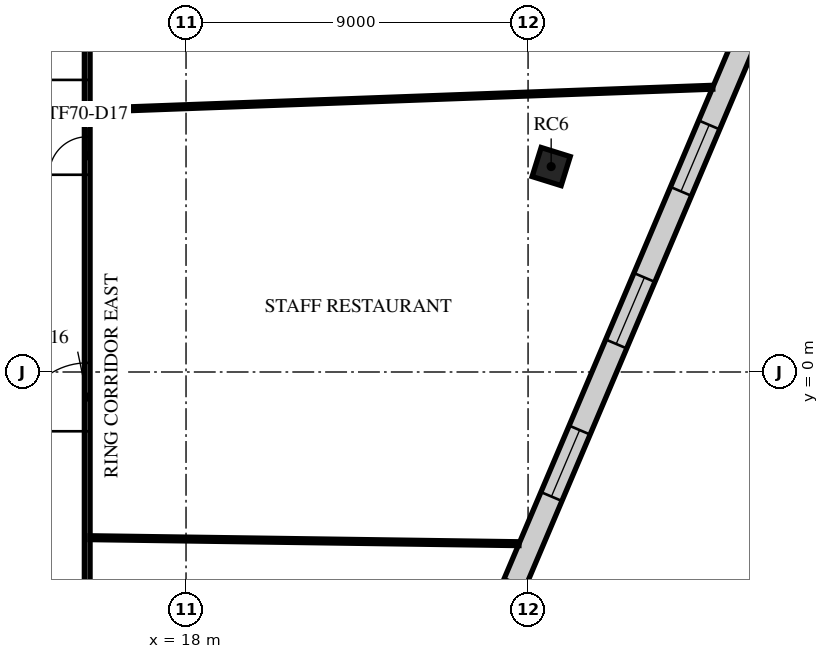
"""IFC4 building model, lengths in metres.
Left out: names, types, materials, properties, quantities, classifications, styles, units other than length and angle.
Written with IfcOpenShell. Run it as: python <this file> out.ifc"""

import sys

from ifc_helpers import new_model, si_unit, direction, frame, frame_2d, origin, origin_2d, place, context, subcontext, project, spatial, rectangle, extrude, element, fill, save


model = new_model("IFC4")
c1 = context("Model", 3, precision=1e-05, world=origin(), true_north=direction((0.0, 1.0)))
c2 = subcontext(c1, "Body", "Model", "MODEL_VIEW")
j1 = project(units=[si_unit("LENGTHUNIT", "METRE"), si_unit("PLANEANGLEUNIT", "RADIAN")], contexts=[c1])
p1 = place(None, origin())
s1 = spatial("IfcSite", under=j1, at=p1, CompositionType="ELEMENT")
p2 = place(p1, origin())
s2 = spatial("IfcBuilding", under=s1, at=p2, CompositionType="ELEMENT")
p3 = place(p2, frame((0.0, 0.0, 296.5)))
s3 = spatial("IfcBuildingStorey", under=s2, at=p3, CompositionType="ELEMENT", Elevation=296.5)
p4 = place(p3, frame((27.608, 5.406, -0.35), z_axis=(0.0, 0.0, 1.0), x_axis=(0.297503182032, 0.954720826567, 0.0)))
e1 = element("IfcColumn", 1, at=p4, inside=s3, PredefinedType="COLUMN", context=c2, shape_type="SweptSolid", body=[
    extrude(rectangle(XDim=0.8, YDim=0.8, at=origin_2d()), origin(), (0.0, 0.0, 1.0), 4.35),
])
p5 = place(p3, frame((15.204, -32.515, 0.0), z_axis=(0.0, 0.0, 1.0), x_axis=(0.390728997462, 0.920505758017, 0.0)))
e2 = element("IfcWall", 2, at=p5, inside=s3, PredefinedType="STANDARD", context=c2, shape_type="SweptSolid", body=[
    extrude(rectangle(XDim=47.979, YDim=0.6, at=frame_2d((23.99, 0.0))), origin(), (0.0, 0.0, 1.0), 3.65),
])
p6 = place(p5, frame((1.231, 0.0, 0.9)))
e3 = element("IfcOpeningElement", 3, at=p6, cuts=e2, PredefinedType="OPENING", context=c2, shape_type="SweptSolid", body=[
    extrude(rectangle(XDim=1.9, YDim=2.1, at=frame_2d((0.95, 1.05))), frame((0.0, 0.31, 0.0), z_axis=(0.0, -1.0, 0.0), x_axis=(1.0, 0.0, 0.0)), (0.0, 0.0, 1.0), 0.62),
])
p7 = place(p5, frame((5.593, 0.0, 0.9)))
e4 = element("IfcOpeningElement", 4, at=p7, cuts=e2, PredefinedType="OPENING", context=c2, shape_type="SweptSolid", body=[
    extrude(rectangle(XDim=1.9, YDim=2.1, at=frame_2d((0.95, 1.05))), frame((0.0, 0.31, 0.0), z_axis=(0.0, -1.0, 0.0), x_axis=(1.0, 0.0, 0.0)), (0.0, 0.0, 1.0), 0.62),
])
p8 = place(p5, frame((9.954, 0.0, 0.9)))
e5 = element("IfcOpeningElement", 5, at=p8, cuts=e2, PredefinedType="OPENING", context=c2, shape_type="SweptSolid", body=[
    extrude(rectangle(XDim=1.9, YDim=2.1, at=frame_2d((0.95, 1.05))), frame((0.0, 0.31, 0.0), z_axis=(0.0, -1.0, 0.0), x_axis=(1.0, 0.0, 0.0)), (0.0, 0.0, 1.0), 0.62),
])
p9 = place(p5, frame((14.316, 0.0, 0.9)))
e6 = element("IfcOpeningElement", 6, at=p9, cuts=e2, PredefinedType="OPENING", context=c2, shape_type="SweptSolid", body=[
    extrude(rectangle(XDim=1.9, YDim=2.1, at=frame_2d((0.95, 1.05))), frame((0.0, 0.31, 0.0), z_axis=(0.0, -1.0, 0.0), x_axis=(1.0, 0.0, 0.0)), (0.0, 0.0, 1.0), 0.62),
])
p10 = place(p5, frame((18.678, 0.0, 0.9)))
e7 = element("IfcOpeningElement", 7, at=p10, cuts=e2, PredefinedType="OPENING", context=c2, shape_type="SweptSolid", body=[
    extrude(rectangle(XDim=1.9, YDim=2.1, at=frame_2d((0.95, 1.05))), frame((0.0, 0.31, 0.0), z_axis=(0.0, -1.0, 0.0), x_axis=(1.0, 0.0, 0.0)), (0.0, 0.0, 1.0), 0.62),
])
p11 = place(p5, frame((23.04, 0.0, 0.9)))
e8 = element("IfcOpeningElement", 8, at=p11, cuts=e2, PredefinedType="OPENING", context=c2, shape_type="SweptSolid", body=[
    extrude(rectangle(XDim=1.9, YDim=2.1, at=frame_2d((0.95, 1.05))), frame((0.0, 0.31, 0.0), z_axis=(0.0, -1.0, 0.0), x_axis=(1.0, 0.0, 0.0)), (0.0, 0.0, 1.0), 0.62),
])
p12 = place(p5, frame((27.401, 0.0, 0.9)))
e9 = element("IfcOpeningElement", 9, at=p12, cuts=e2, PredefinedType="OPENING", context=c2, shape_type="SweptSolid", body=[
    extrude(rectangle(XDim=1.9, YDim=2.1, at=frame_2d((0.95, 1.05))), frame((0.0, 0.31, 0.0), z_axis=(0.0, -1.0, 0.0), x_axis=(1.0, 0.0, 0.0)), (0.0, 0.0, 1.0), 0.62),
])
p13 = place(p5, frame((31.763, 0.0, 0.9)))
e10 = element("IfcOpeningElement", 10, at=p13, cuts=e2, PredefinedType="OPENING", context=c2, shape_type="SweptSolid", body=[
    extrude(rectangle(XDim=1.9, YDim=2.1, at=frame_2d((0.95, 1.05))), frame((0.0, 0.31, 0.0), z_axis=(0.0, -1.0, 0.0), x_axis=(1.0, 0.0, 0.0)), (0.0, 0.0, 1.0), 0.62),
])
p14 = place(p5, frame((36.125, 0.0, 0.9)))
e11 = element("IfcOpeningElement", 11, at=p14, cuts=e2, PredefinedType="OPENING", context=c2, shape_type="SweptSolid", body=[
    extrude(rectangle(XDim=1.9, YDim=2.1, at=frame_2d((0.95, 1.05))), frame((0.0, 0.31, 0.0), z_axis=(0.0, -1.0, 0.0), x_axis=(1.0, 0.0, 0.0)), (0.0, 0.0, 1.0), 0.62),
])
p15 = place(p5, frame((40.487, 0.0, 0.9)))
e12 = element("IfcOpeningElement", 12, at=p15, cuts=e2, PredefinedType="OPENING", context=c2, shape_type="SweptSolid", body=[
    extrude(rectangle(XDim=1.9, YDim=2.1, at=frame_2d((0.95, 1.05))), frame((0.0, 0.31, 0.0), z_axis=(0.0, -1.0, 0.0), x_axis=(1.0, 0.0, 0.0)), (0.0, 0.0, 1.0), 0.62),
])
p16 = place(p5, frame((44.848, 0.0, 0.9)))
e13 = element("IfcOpeningElement", 13, at=p16, cuts=e2, PredefinedType="OPENING", context=c2, shape_type="SweptSolid", body=[
    extrude(rectangle(XDim=1.9, YDim=2.1, at=frame_2d((0.95, 1.05))), frame((0.0, 0.31, 0.0), z_axis=(0.0, -1.0, 0.0), x_axis=(1.0, 0.0, 0.0)), (0.0, 0.0, 1.0), 0.62),
])
p17 = place(p3, frame((15.4, -12.4, 0.0), z_axis=(0.0, 0.0, 1.0), x_axis=(0.0, 1.0, 0.0)))
e14 = element("IfcWall", 14, at=p17, inside=s3, PredefinedType="PARTITIONING", context=c2, shape_type="SweptSolid", body=[
    extrude(rectangle(XDim=24.725, YDim=0.15, at=frame_2d((12.362, 0.0))), origin(), (0.0, 0.0, 1.0), 3.25),
])
p18 = place(p17, frame((2.8, 0.0, 0.0)))
e15 = element("IfcOpeningElement", 15, at=p18, cuts=e14, PredefinedType="OPENING", context=c2, shape_type="SweptSolid", body=[
    extrude(rectangle(XDim=1.8, YDim=2.1, at=frame_2d((0.9, 1.05))), frame((0.0, 0.085, 0.0), z_axis=(0.0, -1.0, 0.0), x_axis=(1.0, 0.0, 0.0)), (0.0, 0.0, 1.0), 0.17),
])
p19 = place(p17, frame((10.84, 0.0, 0.0)))
e16 = element("IfcOpeningElement", 16, at=p19, cuts=e14, PredefinedType="OPENING", context=c2, shape_type="SweptSolid", body=[
    extrude(rectangle(XDim=1.8, YDim=2.1, at=frame_2d((0.9, 1.05))), frame((0.0, 0.085, 0.0), z_axis=(0.0, -1.0, 0.0), x_axis=(1.0, 0.0, 0.0)), (0.0, 0.0, 1.0), 0.17),
])
p20 = place(p17, frame((17.59, 0.0, 0.0)))
e17 = element("IfcOpeningElement", 17, at=p20, cuts=e14, PredefinedType="OPENING", context=c2, shape_type="SweptSolid", body=[
    extrude(rectangle(XDim=1.0, YDim=2.1, at=frame_2d((0.5, 1.05))), frame((0.0, 0.085, 0.0), z_axis=(0.0, -1.0, 0.0), x_axis=(1.0, 0.0, 0.0)), (0.0, 0.0, 1.0), 0.17),
])
p21 = place(p17, frame((20.086, 0.0, 0.0)))
e18 = element("IfcOpeningElement", 18, at=p21, cuts=e14, PredefinedType="OPENING", context=c2, shape_type="SweptSolid", body=[
    extrude(rectangle(XDim=1.8, YDim=2.1, at=frame_2d((0.9, 1.05))), frame((0.0, 0.085, 0.0), z_axis=(0.0, -1.0, 0.0), x_axis=(1.0, 0.0, 0.0)), (0.0, 0.0, 1.0), 0.17),
])
p22 = place(p3, frame((15.476, -4.36, 0.0), z_axis=(0.0, 0.0, 1.0), x_axis=(0.999902345391, -0.013974966252, 0.0)))
e19 = element("IfcWall", 19, at=p22, inside=s3, PredefinedType="PARTITIONING", context=c2, shape_type="SweptSolid", body=[
    extrude(rectangle(XDim=11.286, YDim=0.1, at=frame_2d((5.643, 0.0))), origin(), (0.0, 0.0, 1.0), 3.65),
])
p23 = place(p3, frame((15.477, 6.889, 0.0), z_axis=(0.0, 0.0, 1.0), x_axis=(0.999319883967, 0.036875052648, 0.0)))
e20 = element("IfcWall", 20, at=p23, inside=s3, PredefinedType="PARTITIONING", context=c2, shape_type="SweptSolid", body=[
    extrude(rectangle(XDim=16.393, YDim=0.1, at=frame_2d((8.197, 0.0))), origin(), (0.0, 0.0, 1.0), 3.65),
])
p24 = place(p13, origin())
e21 = element("IfcWindow", 21, at=p24, inside=s3, PartitioningType="SINGLE_PANEL", PredefinedType="WINDOW", context=c2, shape_type="SweptSolid", body=[
    extrude(rectangle(XDim=1.9, YDim=2.1, at=frame_2d((0.95, 1.05))), frame((0.0, 0.03, 0.0), z_axis=(0.0, -1.0, 0.0), x_axis=(1.0, 0.0, 0.0)), (0.0, 0.0, 1.0), 0.06),
])
fill(e10, e21)
p25 = place(p14, origin())
e22 = element("IfcWindow", 22, at=p25, inside=s3, PartitioningType="SINGLE_PANEL", PredefinedType="WINDOW", context=c2, shape_type="SweptSolid", body=[
    extrude(rectangle(XDim=1.9, YDim=2.1, at=frame_2d((0.95, 1.05))), frame((0.0, 0.03, 0.0), z_axis=(0.0, -1.0, 0.0), x_axis=(1.0, 0.0, 0.0)), (0.0, 0.0, 1.0), 0.06),
])
fill(e11, e22)
p26 = place(p15, origin())
e23 = element("IfcWindow", 23, at=p26, inside=s3, PartitioningType="SINGLE_PANEL", PredefinedType="WINDOW", context=c2, shape_type="SweptSolid", body=[
    extrude(rectangle(XDim=1.9, YDim=2.1, at=frame_2d((0.95, 1.05))), frame((0.0, 0.03, 0.0), z_axis=(0.0, -1.0, 0.0), x_axis=(1.0, 0.0, 0.0)), (0.0, 0.0, 1.0), 0.06),
])
fill(e12, e23)
p27 = place(p19, frame((1.8, 0.0, 0.0), z_axis=(0.0, 0.0, 1.0), x_axis=(-1.0, 0.0, 0.0)))
e24 = element("IfcDoor", 24, at=p27, inside=s3, OperationType="DOUBLE_DOOR_SINGLE_SWING", PredefinedType="DOOR", context=c2, shape_type="SweptSolid", body=[
    extrude(rectangle(XDim=1.8, YDim=2.1, at=frame_2d((0.9, 1.05))), frame((0.0, 0.025, 0.0), z_axis=(0.0, -1.0, 0.0), x_axis=(1.0, 0.0, 0.0)), (0.0, 0.0, 1.0), 0.05),
])
fill(e16, e24)
p28 = place(p20, frame((1.0, 0.0, 0.0), z_axis=(0.0, 0.0, 1.0), x_axis=(-1.0, 0.0, 0.0)))
e25 = element("IfcDoor", 25, at=p28, inside=s3, OperationType="SINGLE_SWING_LEFT", PredefinedType="DOOR", context=c2, shape_type="SweptSolid", body=[
    extrude(rectangle(XDim=1.0, YDim=2.1, at=frame_2d((0.5, 1.05))), frame((0.0, 0.025, 0.0), z_axis=(0.0, -1.0, 0.0), x_axis=(1.0, 0.0, 0.0)), (0.0, 0.0, 1.0), 0.05),
])
fill(e17, e25)
p29 = place(p21, frame((1.8, 0.0, 0.0), z_axis=(0.0, 0.0, 1.0), x_axis=(-1.0, 0.0, 0.0)))
e26 = element("IfcDoor", 26, at=p29, inside=s3, OperationType="DOUBLE_DOOR_SINGLE_SWING", PredefinedType="DOOR", context=c2, shape_type="SweptSolid", body=[
    extrude(rectangle(XDim=1.8, YDim=2.1, at=frame_2d((0.9, 1.05))), frame((0.0, 0.025, 0.0), z_axis=(0.0, -1.0, 0.0), x_axis=(1.0, 0.0, 0.0)), (0.0, 0.0, 1.0), 0.05),
])
fill(e18, e26)
save(model, sys.argv[1])
